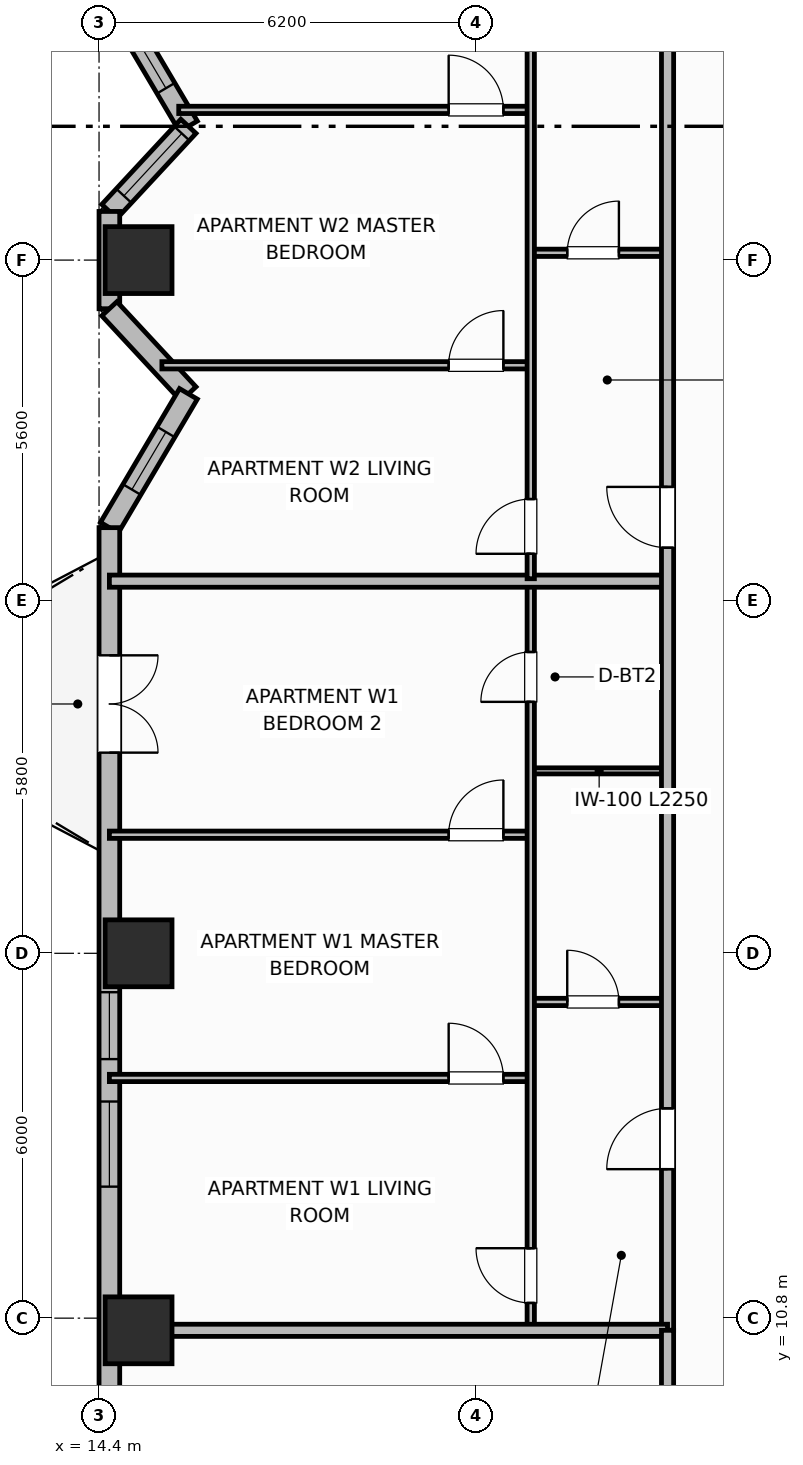
"""IFC4 building model, lengths in metres.
Left out: names, types, materials, properties, quantities, classifications, styles, units other than length and angle.
Written with IfcOpenShell. Run it as: python <this file> out.ifc"""

import sys

from ifc_helpers import new_model, si_unit, direction, frame, frame_2d, origin, origin_2d, place, context, subcontext, project, spatial, rectangle, extrude, element, fill, save


model = new_model("IFC4")
c1 = context("Model", 3, precision=1e-05, world=origin(), true_north=direction((0.0, 1.0)))
c2 = subcontext(c1, "Body", "Model", "MODEL_VIEW")
j1 = project(units=[si_unit("LENGTHUNIT", "METRE"), si_unit("PLANEANGLEUNIT", "RADIAN")], contexts=[c1])
p1 = place(None, origin())
s1 = spatial("IfcSite", under=j1, at=p1, CompositionType="ELEMENT")
p2 = place(p1, origin())
s2 = spatial("IfcBuilding", under=s1, at=p2, CompositionType="ELEMENT")
p3 = place(p2, frame((0.0, 0.0, 110.5)))
s3 = spatial("IfcBuildingStorey", under=s2, at=p3, CompositionType="ELEMENT", Elevation=110.5)
for number, where, z_axis, x_axis in (
    (1, (15.05, 10.6, 0.0), (0.0, 0.0, 1.0), (1.0, 0.0, 0.0)),
    (2, (15.05, 16.8, 0.0), (0.0, 0.0, 1.0), (1.0, 0.0, 0.0)),
    (3, (15.05, 28.2, 0.0), (0.0, 0.0, 1.0), (1.0, 0.0, 0.0)),
):
    element("IfcColumn", number, at=place(p3, frame(where, z_axis=z_axis, x_axis=x_axis)), inside=s3, PredefinedType="COLUMN", context=c2, shape_type="SweptSolid", body=[
        extrude(rectangle(XDim=1.1, YDim=1.1, at=origin_2d()), origin(), (0.0, 0.0, 1.0), 3.7),
    ])
p4 = place(p3, frame((14.57, 32.6, 0.0), z_axis=(0.0, 0.0, 1.0), x_axis=(0.508710000703, -0.860937939218, 0.0)))
e4 = element("IfcWall", 4, at=p4, inside=s3, PredefinedType="SOLIDWALL", context=c2, shape_type="SweptSolid", body=[
    extrude(rectangle(XDim=2.556, YDim=0.34, at=frame_2d((1.278, 0.0))), origin(), (0.0, 0.0, 1.0), 2.7),
])
p5 = place(p4, frame((0.728, 0.0, 0.89)))
e5 = element("IfcOpeningElement", 5, at=p5, cuts=e4, PredefinedType="OPENING", context=c2, shape_type="SweptSolid", body=[
    extrude(rectangle(XDim=1.1, YDim=1.65, at=frame_2d((0.55, 0.825))), frame((0.0, 0.18, 0.0), z_axis=(0.0, -1.0, 0.0), x_axis=(1.0, 0.0, 0.0)), (0.0, 0.0, 1.0), 0.36),
])
p6 = place(p3, frame((15.87, 30.4, 0.0), z_axis=(0.0, 0.0, 1.0), x_axis=(-0.68049031116, -0.732757078722, 0.0)))
e6 = element("IfcWall", 6, at=p6, inside=s3, PredefinedType="SOLIDWALL", context=c2, shape_type="SweptSolid", body=[
    extrude(rectangle(XDim=1.91, YDim=0.34, at=frame_2d((0.955, 0.0))), origin(), (0.0, 0.0, 1.0), 2.7),
])
p7 = place(p6, frame((0.16, 0.0, 0.69)))
e7 = element("IfcOpeningElement", 7, at=p7, cuts=e6, PredefinedType="OPENING", context=c2, shape_type="SweptSolid", body=[
    extrude(rectangle(XDim=1.4, YDim=1.85, at=frame_2d((0.7, 0.925))), frame((0.0, 0.18, 0.0), z_axis=(0.0, -1.0, 0.0), x_axis=(1.0, 0.0, 0.0)), (0.0, 0.0, 1.0), 0.36),
])
p8 = place(p3, frame((14.57, 29.0, 0.0), z_axis=(0.0, 0.0, 1.0), x_axis=(0.0, -1.0, 0.0)))
e8 = element("IfcWall", 8, at=p8, inside=s3, PredefinedType="SOLIDWALL", context=c2, shape_type="SweptSolid", body=[
    extrude(rectangle(XDim=1.6, YDim=0.34, at=frame_2d((0.8, 0.0))), origin(), (0.0, 0.0, 1.0), 2.7),
])
p9 = place(p3, frame((14.57, 27.4, 0.0), z_axis=(0.0, 0.0, 1.0), x_axis=(0.68049031116, -0.732757078722, 0.0)))
e9 = element("IfcWall", 9, at=p9, inside=s3, PredefinedType="SOLIDWALL", context=c2, shape_type="SweptSolid", body=[
    extrude(rectangle(XDim=1.91, YDim=0.34, at=frame_2d((0.955, 0.0))), origin(), (0.0, 0.0, 1.0), 2.7),
])
p10 = place(p3, frame((15.87, 26.0, 0.0), z_axis=(0.0, 0.0, 1.0), x_axis=(-0.508751843651, -0.860913213734, 0.0)))
e10 = element("IfcWall", 10, at=p10, inside=s3, PredefinedType="SOLIDWALL", context=c2, shape_type="SweptSolid", body=[
    extrude(rectangle(XDim=2.555, YDim=0.34, at=frame_2d((1.278, 0.0))), origin(), (0.0, 0.0, 1.0), 2.7),
])
p11 = place(p10, frame((0.728, 0.0, 0.89)))
e11 = element("IfcOpeningElement", 11, at=p11, cuts=e10, PredefinedType="OPENING", context=c2, shape_type="SweptSolid", body=[
    extrude(rectangle(XDim=1.1, YDim=1.65, at=frame_2d((0.55, 0.825))), frame((0.0, 0.18, 0.0), z_axis=(0.0, -1.0, 0.0), x_axis=(1.0, 0.0, 0.0)), (0.0, 0.0, 1.0), 0.36),
])
p12 = place(p3, frame((14.57, 23.8, 0.0), z_axis=(0.0, 0.0, 1.0), x_axis=(0.0, -1.0, 0.0)))
e12 = element("IfcWall", 12, at=p12, inside=s3, PredefinedType="SOLIDWALL", context=c2, shape_type="SweptSolid", body=[
    extrude(rectangle(XDim=14.8, YDim=0.34, at=frame_2d((7.4, 0.0))), origin(), (0.0, 0.0, 1.0), 2.7),
])
p13 = place(p12, frame((2.1, 0.0, 0.0)))
e13 = element("IfcOpeningElement", 13, at=p13, cuts=e12, PredefinedType="OPENING", context=c2, shape_type="SweptSolid", body=[
    extrude(rectangle(XDim=1.6, YDim=2.1, at=frame_2d((0.8, 1.05))), frame((0.0, 0.18, 0.0), z_axis=(0.0, -1.0, 0.0), x_axis=(1.0, 0.0, 0.0)), (0.0, 0.0, 1.0), 0.36),
])
p14 = place(p12, frame((7.64, 0.0, 0.89)))
e14 = element("IfcOpeningElement", 14, at=p14, cuts=e12, PredefinedType="OPENING", context=c2, shape_type="SweptSolid", body=[
    extrude(rectangle(XDim=1.1, YDim=1.65, at=frame_2d((0.55, 0.825))), frame((0.0, 0.18, 0.0), z_axis=(0.0, -1.0, 0.0), x_axis=(1.0, 0.0, 0.0)), (0.0, 0.0, 1.0), 0.36),
])
p15 = place(p12, frame((9.438, 0.0, 0.73)))
e15 = element("IfcOpeningElement", 15, at=p15, cuts=e12, PredefinedType="OPENING", context=c2, shape_type="SweptSolid", body=[
    extrude(rectangle(XDim=1.4, YDim=1.85, at=frame_2d((0.7, 0.925))), frame((0.0, 0.18, 0.0), z_axis=(0.0, -1.0, 0.0), x_axis=(1.0, 0.0, 0.0)), (0.0, 0.0, 1.0), 0.36),
])
p16 = place(p3, frame((21.5, 16.0, 0.0), z_axis=(0.0, 0.0, 1.0), x_axis=(1.0, 0.0, 0.0)))
e16 = element("IfcWall", 16, at=p16, inside=s3, PredefinedType="PARTITIONING", context=c2, shape_type="SweptSolid", body=[
    extrude(rectangle(XDim=2.25, YDim=0.12, at=frame_2d((1.125, 0.0))), origin(), (0.0, 0.0, 1.0), 2.53),
])
p17 = place(p16, frame((0.6, 0.0, 0.0)))
e17 = element("IfcOpeningElement", 17, at=p17, cuts=e16, PredefinedType="OPENING", context=c2, shape_type="SweptSolid", body=[
    extrude(rectangle(XDim=0.85, YDim=2.1, at=frame_2d((0.425, 1.05))), frame((0.0, 0.07, 0.0), z_axis=(0.0, -1.0, 0.0), x_axis=(1.0, 0.0, 0.0)), (0.0, 0.0, 1.0), 0.14),
])
p18 = place(p3, frame((21.5, 19.8, 0.0), z_axis=(0.0, 0.0, 1.0), x_axis=(1.0, 0.0, 0.0)))
e18 = element("IfcWall", 18, at=p18, inside=s3, PredefinedType="PARTITIONING", context=c2, shape_type="SweptSolid", body=[
    extrude(rectangle(XDim=2.25, YDim=0.1, at=frame_2d((1.125, 0.0))), origin(), (0.0, 0.0, 1.0), 2.53),
])
p19 = place(p3, frame((14.57, 14.75, 0.0), z_axis=(0.0, 0.0, 1.0), x_axis=(1.0, 0.0, 0.0)))
e19 = element("IfcWall", 19, at=p19, inside=s3, PredefinedType="PARTITIONING", context=c2, shape_type="SweptSolid", body=[
    extrude(rectangle(XDim=6.93, YDim=0.12, at=frame_2d((3.465, 0.0))), origin(), (0.0, 0.0, 1.0), 2.53),
])
p20 = place(p19, frame((5.58, 0.0, 0.0)))
e20 = element("IfcOpeningElement", 20, at=p20, cuts=e19, PredefinedType="OPENING", context=c2, shape_type="SweptSolid", body=[
    extrude(rectangle(XDim=0.9, YDim=2.1, at=frame_2d((0.45, 1.05))), frame((0.0, 0.07, 0.0), z_axis=(0.0, -1.0, 0.0), x_axis=(1.0, 0.0, 0.0)), (0.0, 0.0, 1.0), 0.14),
])
p21 = place(p3, frame((14.57, 18.75, 0.0), z_axis=(0.0, 0.0, 1.0), x_axis=(1.0, 0.0, 0.0)))
e21 = element("IfcWall", 21, at=p21, inside=s3, PredefinedType="PARTITIONING", context=c2, shape_type="SweptSolid", body=[
    extrude(rectangle(XDim=6.93, YDim=0.12, at=frame_2d((3.465, 0.0))), origin(), (0.0, 0.0, 1.0), 2.53),
])
p22 = place(p21, frame((5.58, 0.0, 0.0)))
e22 = element("IfcOpeningElement", 22, at=p22, cuts=e21, PredefinedType="OPENING", context=c2, shape_type="SweptSolid", body=[
    extrude(rectangle(XDim=0.9, YDim=2.1, at=frame_2d((0.45, 1.05))), frame((0.0, 0.07, 0.0), z_axis=(0.0, -1.0, 0.0), x_axis=(1.0, 0.0, 0.0)), (0.0, 0.0, 1.0), 0.14),
])
p23 = place(p3, frame((21.5, 10.64, 0.0), z_axis=(0.0, 0.0, 1.0), x_axis=(0.0, 1.0, 0.0)))
e23 = element("IfcWall", 23, at=p23, inside=s3, PredefinedType="PARTITIONING", context=c2, shape_type="SweptSolid", body=[
    extrude(rectangle(XDim=12.24, YDim=0.12, at=frame_2d((6.12, 0.0))), origin(), (0.0, 0.0, 1.0), 2.53),
])
p24 = place(p23, frame((0.41, 0.0, 0.0)))
e24 = element("IfcOpeningElement", 24, at=p24, cuts=e23, PredefinedType="OPENING", context=c2, shape_type="SweptSolid", body=[
    extrude(rectangle(XDim=0.9, YDim=2.1, at=frame_2d((0.45, 1.05))), frame((0.0, 0.07, 0.0), z_axis=(0.0, -1.0, 0.0), x_axis=(1.0, 0.0, 0.0)), (0.0, 0.0, 1.0), 0.14),
])
p25 = place(p23, frame((10.295, 0.0, 0.0)))
e25 = element("IfcOpeningElement", 25, at=p25, cuts=e23, PredefinedType="OPENING", context=c2, shape_type="SweptSolid", body=[
    extrude(rectangle(XDim=0.82, YDim=2.08, at=frame_2d((0.41, 1.04))), frame((0.0, 0.07, 0.0), z_axis=(0.0, -1.0, 0.0), x_axis=(1.0, 0.0, 0.0)), (0.0, 0.0, 1.0), 0.14),
])
p26 = place(p3, frame((14.57, 22.92, 0.0), z_axis=(0.0, 0.0, 1.0), x_axis=(1.0, 0.0, 0.0)))
e26 = element("IfcWall", 26, at=p26, inside=s3, PredefinedType="PARTITIONING", context=c2, shape_type="SweptSolid", body=[
    extrude(rectangle(XDim=9.18, YDim=0.2, at=frame_2d((4.59, 0.0))), origin(), (0.0, 0.0, 1.0), 2.53),
])
p27 = place(p3, frame((21.5, 28.32, 0.0), z_axis=(0.0, 0.0, 1.0), x_axis=(1.0, 0.0, 0.0)))
e27 = element("IfcWall", 27, at=p27, inside=s3, PredefinedType="PARTITIONING", context=c2, shape_type="SweptSolid", body=[
    extrude(rectangle(XDim=2.25, YDim=0.12, at=frame_2d((1.125, 0.0))), origin(), (0.0, 0.0, 1.0), 2.53),
])
p28 = place(p27, frame((0.6, 0.0, 0.0)))
e28 = element("IfcOpeningElement", 28, at=p28, cuts=e27, PredefinedType="OPENING", context=c2, shape_type="SweptSolid", body=[
    extrude(rectangle(XDim=0.85, YDim=2.1, at=frame_2d((0.425, 1.05))), frame((0.0, 0.07, 0.0), z_axis=(0.0, -1.0, 0.0), x_axis=(1.0, 0.0, 0.0)), (0.0, 0.0, 1.0), 0.14),
])
p29 = place(p3, frame((15.434, 26.47, 0.0), z_axis=(0.0, 0.0, 1.0), x_axis=(1.0, 0.0, 0.0)))
e29 = element("IfcWall", 29, at=p29, inside=s3, PredefinedType="PARTITIONING", context=c2, shape_type="SweptSolid", body=[
    extrude(rectangle(XDim=6.066, YDim=0.12, at=frame_2d((3.033, 0.0))), origin(), (0.0, 0.0, 1.0), 2.53),
])
p30 = place(p29, frame((4.716, 0.0, 0.0)))
e30 = element("IfcOpeningElement", 30, at=p30, cuts=e29, PredefinedType="OPENING", context=c2, shape_type="SweptSolid", body=[
    extrude(rectangle(XDim=0.9, YDim=2.1, at=frame_2d((0.45, 1.05))), frame((0.0, 0.07, 0.0), z_axis=(0.0, -1.0, 0.0), x_axis=(1.0, 0.0, 0.0)), (0.0, 0.0, 1.0), 0.14),
])
p31 = place(p3, frame((15.71, 30.67, 0.0), z_axis=(0.0, 0.0, 1.0), x_axis=(1.0, 0.0, 0.0)))
e31 = element("IfcWall", 31, at=p31, inside=s3, PredefinedType="PARTITIONING", context=c2, shape_type="SweptSolid", body=[
    extrude(rectangle(XDim=5.79, YDim=0.12, at=frame_2d((2.895, 0.0))), origin(), (0.0, 0.0, 1.0), 2.53),
])
p32 = place(p31, frame((4.439, 0.0, 0.0)))
e32 = element("IfcOpeningElement", 32, at=p32, cuts=e31, PredefinedType="OPENING", context=c2, shape_type="SweptSolid", body=[
    extrude(rectangle(XDim=0.9, YDim=2.1, at=frame_2d((0.45, 1.05))), frame((0.0, 0.07, 0.0), z_axis=(0.0, -1.0, 0.0), x_axis=(1.0, 0.0, 0.0)), (0.0, 0.0, 1.0), 0.14),
])
p33 = place(p3, frame((21.5, 22.96, 0.0), z_axis=(0.0, 0.0, 1.0), x_axis=(0.0, 1.0, 0.0)))
e33 = element("IfcWall", 33, at=p33, inside=s3, PredefinedType="PARTITIONING", context=c2, shape_type="SweptSolid", body=[
    extrude(rectangle(XDim=11.536, YDim=0.12, at=frame_2d((5.768, 0.0))), origin(), (0.0, 0.0, 1.0), 2.53),
])
p34 = place(p33, frame((0.41, 0.0, 0.0)))
e34 = element("IfcOpeningElement", 34, at=p34, cuts=e33, PredefinedType="OPENING", context=c2, shape_type="SweptSolid", body=[
    extrude(rectangle(XDim=0.9, YDim=2.1, at=frame_2d((0.45, 1.05))), frame((0.0, 0.07, 0.0), z_axis=(0.0, -1.0, 0.0), x_axis=(1.0, 0.0, 0.0)), (0.0, 0.0, 1.0), 0.14),
])
p35 = place(p3, frame((23.75, 10.6, 0.0), z_axis=(0.0, 0.0, 1.0), x_axis=(0.0, 1.0, 0.0)))
e35 = element("IfcWall", 35, at=p35, inside=s3, PredefinedType="PARTITIONING", context=c2, shape_type="SweptSolid", body=[
    extrude(rectangle(XDim=35.2, YDim=0.2, at=frame_2d((17.6, 0.0))), origin(), (0.0, 0.0, 1.0), 2.53),
])
p36 = place(p35, frame((2.65, 0.0, 0.0)))
e36 = element("IfcOpeningElement", 36, at=p36, cuts=e35, PredefinedType="OPENING", context=c2, shape_type="SweptSolid", body=[
    extrude(rectangle(XDim=1.0, YDim=2.15, at=frame_2d((0.5, 1.075))), frame((0.0, 0.11, 0.0), z_axis=(0.0, -1.0, 0.0), x_axis=(1.0, 0.0, 0.0)), (0.0, 0.0, 1.0), 0.22),
])
p37 = place(p35, frame((12.87, 0.0, 0.0)))
e37 = element("IfcOpeningElement", 37, at=p37, cuts=e35, PredefinedType="OPENING", context=c2, shape_type="SweptSolid", body=[
    extrude(rectangle(XDim=1.0, YDim=2.15, at=frame_2d((0.5, 1.075))), frame((0.0, 0.11, 0.0), z_axis=(0.0, -1.0, 0.0), x_axis=(1.0, 0.0, 0.0)), (0.0, 0.0, 1.0), 0.22),
])
p38 = place(p35, frame((24.486, 0.0, 0.0)))
e38 = element("IfcOpeningElement", 38, at=p38, cuts=e35, PredefinedType="OPENING", context=c2, shape_type="SweptSolid", body=[
    extrude(rectangle(XDim=1.0, YDim=2.15, at=frame_2d((0.5, 1.075))), frame((0.0, 0.11, 0.0), z_axis=(0.0, -1.0, 0.0), x_axis=(1.0, 0.0, 0.0)), (0.0, 0.0, 1.0), 0.22),
])
p39 = place(p3, frame((14.99, 10.6, 0.0), z_axis=(0.0, 0.0, 1.0), x_axis=(1.0, 0.0, 0.0)))
e39 = element("IfcWall", 39, at=p39, inside=s3, PredefinedType="PARTITIONING", context=c2, shape_type="SweptSolid", body=[
    extrude(rectangle(XDim=8.76, YDim=0.2, at=frame_2d((4.38, 0.0))), origin(), (0.0, 0.0, 1.0), 2.53),
])
p40 = place(p3, frame((23.75, 4.97, 0.0), z_axis=(0.0, 0.0, 1.0), x_axis=(0.0, 1.0, 0.0)))
e40 = element("IfcWall", 40, at=p40, inside=s3, PredefinedType="PARTITIONING", context=c2, shape_type="SweptSolid", body=[
    extrude(rectangle(XDim=5.63, YDim=0.2, at=frame_2d((2.815, 0.0))), origin(), (0.0, 0.0, 1.0), 2.53),
])
p41 = place(p5, origin())
e41 = element("IfcWindow", 41, at=p41, inside=s3, PartitioningType="SINGLE_PANEL", PredefinedType="WINDOW", context=c2, shape_type="SweptSolid", body=[
    extrude(rectangle(XDim=1.1, YDim=1.65, at=frame_2d((0.55, 0.825))), frame((0.0, 0.03, 0.0), z_axis=(0.0, -1.0, 0.0), x_axis=(1.0, 0.0, 0.0)), (0.0, 0.0, 1.0), 0.06),
])
fill(e5, e41)
p42 = place(p7, origin())
e42 = element("IfcWindow", 42, at=p42, inside=s3, PartitioningType="SINGLE_PANEL", PredefinedType="WINDOW", context=c2, shape_type="SweptSolid", body=[
    extrude(rectangle(XDim=1.4, YDim=1.85, at=frame_2d((0.7, 0.925))), frame((0.0, 0.03, 0.0), z_axis=(0.0, -1.0, 0.0), x_axis=(1.0, 0.0, 0.0)), (0.0, 0.0, 1.0), 0.06),
])
fill(e7, e42)
p43 = place(p11, origin())
e43 = element("IfcWindow", 43, at=p43, inside=s3, PartitioningType="SINGLE_PANEL", PredefinedType="WINDOW", context=c2, shape_type="SweptSolid", body=[
    extrude(rectangle(XDim=1.1, YDim=1.65, at=frame_2d((0.55, 0.825))), frame((0.0, 0.03, 0.0), z_axis=(0.0, -1.0, 0.0), x_axis=(1.0, 0.0, 0.0)), (0.0, 0.0, 1.0), 0.06),
])
fill(e11, e43)
p44 = place(p13, origin())
e44 = element("IfcDoor", 44, at=p44, inside=s3, OperationType="DOUBLE_DOOR_SINGLE_SWING", PredefinedType="DOOR", context=c2, shape_type="SweptSolid", body=[
    extrude(rectangle(XDim=1.6, YDim=2.1, at=frame_2d((0.8, 1.05))), frame((0.0, 0.025, 0.0), z_axis=(0.0, -1.0, 0.0), x_axis=(1.0, 0.0, 0.0)), (0.0, 0.0, 1.0), 0.05),
])
fill(e13, e44)
p45 = place(p14, origin())
e45 = element("IfcWindow", 45, at=p45, inside=s3, PartitioningType="SINGLE_PANEL", PredefinedType="WINDOW", context=c2, shape_type="SweptSolid", body=[
    extrude(rectangle(XDim=1.1, YDim=1.65, at=frame_2d((0.55, 0.825))), frame((0.0, 0.03, 0.0), z_axis=(0.0, -1.0, 0.0), x_axis=(1.0, 0.0, 0.0)), (0.0, 0.0, 1.0), 0.06),
])
fill(e14, e45)
p46 = place(p15, origin())
e46 = element("IfcWindow", 46, at=p46, inside=s3, PartitioningType="SINGLE_PANEL", PredefinedType="WINDOW", context=c2, shape_type="SweptSolid", body=[
    extrude(rectangle(XDim=1.4, YDim=1.85, at=frame_2d((0.7, 0.925))), frame((0.0, 0.03, 0.0), z_axis=(0.0, -1.0, 0.0), x_axis=(1.0, 0.0, 0.0)), (0.0, 0.0, 1.0), 0.06),
])
fill(e15, e46)
p47 = place(p17, origin())
e47 = element("IfcDoor", 47, at=p47, inside=s3, OperationType="SINGLE_SWING_LEFT", PredefinedType="DOOR", context=c2, shape_type="SweptSolid", body=[
    extrude(rectangle(XDim=0.85, YDim=2.1, at=frame_2d((0.425, 1.05))), frame((0.0, 0.025, 0.0), z_axis=(0.0, -1.0, 0.0), x_axis=(1.0, 0.0, 0.0)), (0.0, 0.0, 1.0), 0.05),
])
fill(e17, e47)
p48 = place(p20, origin())
e48 = element("IfcDoor", 48, at=p48, inside=s3, OperationType="SINGLE_SWING_LEFT", PredefinedType="DOOR", context=c2, shape_type="SweptSolid", body=[
    extrude(rectangle(XDim=0.9, YDim=2.1, at=frame_2d((0.45, 1.05))), frame((0.0, 0.025, 0.0), z_axis=(0.0, -1.0, 0.0), x_axis=(1.0, 0.0, 0.0)), (0.0, 0.0, 1.0), 0.05),
])
fill(e20, e48)
p49 = place(p22, origin())
e49 = element("IfcDoor", 49, at=p49, inside=s3, OperationType="SINGLE_SWING_RIGHT", PredefinedType="DOOR", context=c2, shape_type="SweptSolid", body=[
    extrude(rectangle(XDim=0.9, YDim=2.1, at=frame_2d((0.45, 1.05))), frame((0.0, 0.025, 0.0), z_axis=(0.0, -1.0, 0.0), x_axis=(1.0, 0.0, 0.0)), (0.0, 0.0, 1.0), 0.05),
])
fill(e22, e49)
p50 = place(p24, origin())
e50 = element("IfcDoor", 50, at=p50, inside=s3, OperationType="SINGLE_SWING_RIGHT", PredefinedType="DOOR", context=c2, shape_type="SweptSolid", body=[
    extrude(rectangle(XDim=0.9, YDim=2.1, at=frame_2d((0.45, 1.05))), frame((0.0, 0.025, 0.0), z_axis=(0.0, -1.0, 0.0), x_axis=(1.0, 0.0, 0.0)), (0.0, 0.0, 1.0), 0.05),
])
fill(e24, e50)
p51 = place(p25, origin())
e51 = element("IfcDoor", 51, at=p51, inside=s3, OperationType="SINGLE_SWING_LEFT", PredefinedType="DOOR", context=c2, shape_type="SweptSolid", body=[
    extrude(rectangle(XDim=0.82, YDim=2.08, at=frame_2d((0.41, 1.04))), frame((0.0, 0.025, 0.0), z_axis=(0.0, -1.0, 0.0), x_axis=(1.0, 0.0, 0.0)), (0.0, 0.0, 1.0), 0.05),
])
fill(e25, e51)
p52 = place(p28, origin())
e52 = element("IfcDoor", 52, at=p52, inside=s3, OperationType="SINGLE_SWING_RIGHT", PredefinedType="DOOR", context=c2, shape_type="SweptSolid", body=[
    extrude(rectangle(XDim=0.85, YDim=2.1, at=frame_2d((0.425, 1.05))), frame((0.0, 0.025, 0.0), z_axis=(0.0, -1.0, 0.0), x_axis=(1.0, 0.0, 0.0)), (0.0, 0.0, 1.0), 0.05),
])
fill(e28, e52)
p53 = place(p30, origin())
e53 = element("IfcDoor", 53, at=p53, inside=s3, OperationType="SINGLE_SWING_RIGHT", PredefinedType="DOOR", context=c2, shape_type="SweptSolid", body=[
    extrude(rectangle(XDim=0.9, YDim=2.1, at=frame_2d((0.45, 1.05))), frame((0.0, 0.025, 0.0), z_axis=(0.0, -1.0, 0.0), x_axis=(1.0, 0.0, 0.0)), (0.0, 0.0, 1.0), 0.05),
])
fill(e30, e53)
p54 = place(p32, origin())
e54 = element("IfcDoor", 54, at=p54, inside=s3, OperationType="SINGLE_SWING_LEFT", PredefinedType="DOOR", context=c2, shape_type="SweptSolid", body=[
    extrude(rectangle(XDim=0.9, YDim=2.1, at=frame_2d((0.45, 1.05))), frame((0.0, 0.025, 0.0), z_axis=(0.0, -1.0, 0.0), x_axis=(1.0, 0.0, 0.0)), (0.0, 0.0, 1.0), 0.05),
])
fill(e32, e54)
p55 = place(p34, origin())
e55 = element("IfcDoor", 55, at=p55, inside=s3, OperationType="SINGLE_SWING_LEFT", PredefinedType="DOOR", context=c2, shape_type="SweptSolid", body=[
    extrude(rectangle(XDim=0.9, YDim=2.1, at=frame_2d((0.45, 1.05))), frame((0.0, 0.025, 0.0), z_axis=(0.0, -1.0, 0.0), x_axis=(1.0, 0.0, 0.0)), (0.0, 0.0, 1.0), 0.05),
])
fill(e34, e55)
p56 = place(p36, origin())
e56 = element("IfcDoor", 56, at=p56, inside=s3, OperationType="SINGLE_SWING_LEFT", PredefinedType="DOOR", context=c2, shape_type="SweptSolid", body=[
    extrude(rectangle(XDim=1.0, YDim=2.15, at=frame_2d((0.5, 1.075))), frame((0.0, 0.025, 0.0), z_axis=(0.0, -1.0, 0.0), x_axis=(1.0, 0.0, 0.0)), (0.0, 0.0, 1.0), 0.05),
])
fill(e36, e56)
p57 = place(p37, origin())
e57 = element("IfcDoor", 57, at=p57, inside=s3, OperationType="SINGLE_SWING_RIGHT", PredefinedType="DOOR", context=c2, shape_type="SweptSolid", body=[
    extrude(rectangle(XDim=1.0, YDim=2.15, at=frame_2d((0.5, 1.075))), frame((0.0, 0.025, 0.0), z_axis=(0.0, -1.0, 0.0), x_axis=(1.0, 0.0, 0.0)), (0.0, 0.0, 1.0), 0.05),
])
fill(e37, e57)
save(model, sys.argv[1])
